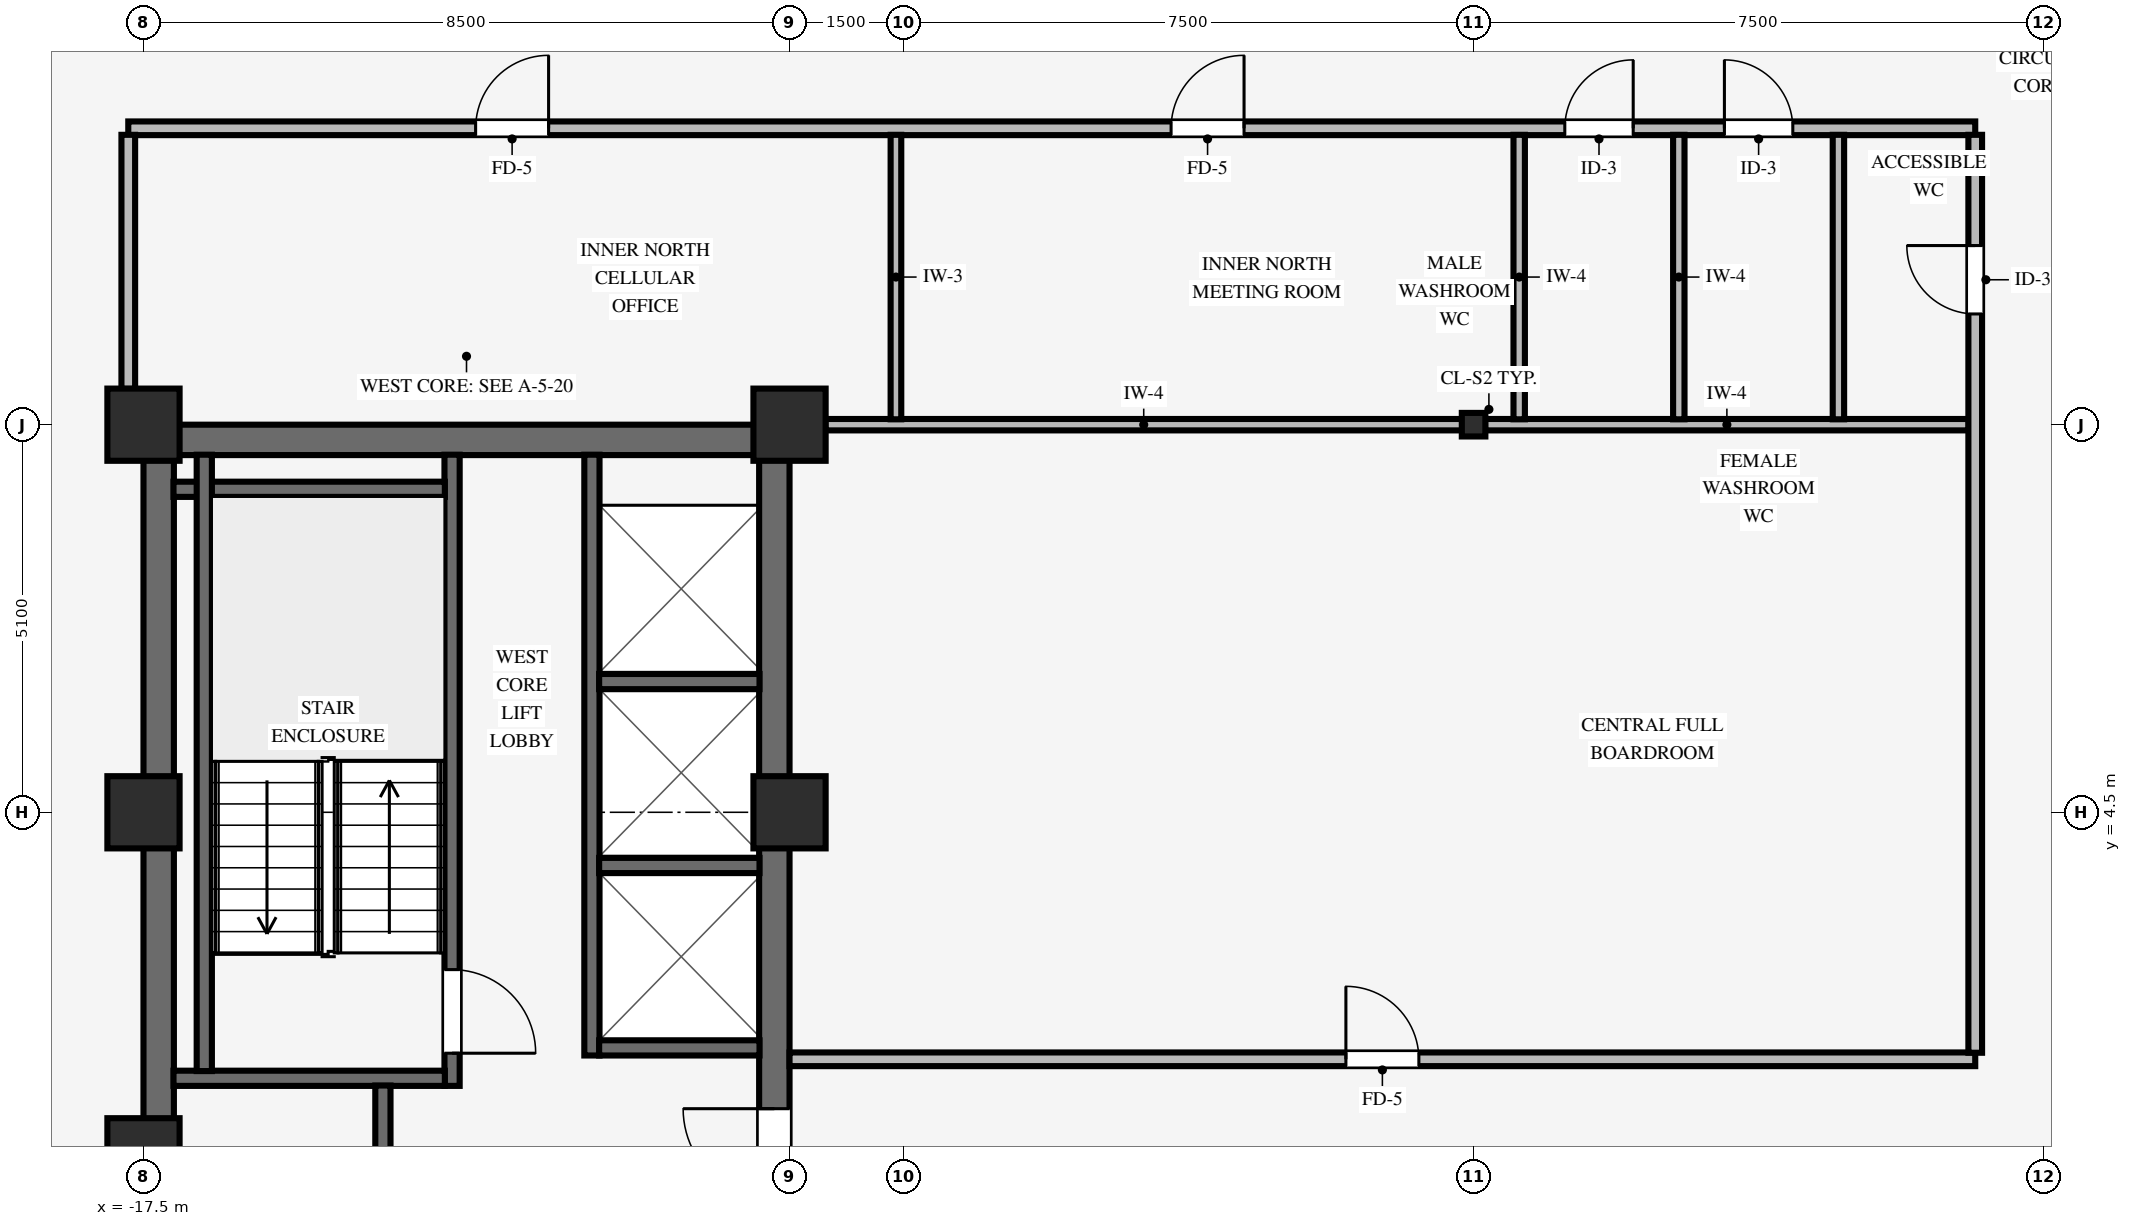
"""IFC4 building model, lengths in metres.
Left out: names, types, materials, properties, quantities, classifications, styles, units other than length and angle.
Written with IfcOpenShell. Run it as: python <this file> out.ifc"""

import sys

from ifc_helpers import new_model, si_unit, direction, frame, frame_2d, origin, origin_2d, place, context, subcontext, project, spatial, rectangle, i_section, extrude, source, transform, mapped, element, fill, save


model = new_model("IFC4")
c1 = context("Model", 3, precision=1e-05, world=origin(), true_north=direction((0.0, 1.0)))
c2 = subcontext(c1, "Body", "Model", "MODEL_VIEW")
j1 = project(units=[si_unit("LENGTHUNIT", "METRE"), si_unit("PLANEANGLEUNIT", "RADIAN")], contexts=[c1])
p1 = place(None, origin())
s1 = spatial("IfcSite", under=j1, at=p1, CompositionType="ELEMENT")
p2 = place(p1, origin())
s2 = spatial("IfcBuilding", under=s1, at=p2, CompositionType="ELEMENT")
p3 = place(p2, frame((0.0, 0.0, 174.95)))
s3 = spatial("IfcBuildingStorey", under=s2, at=p3, CompositionType="ELEMENT", Elevation=174.95)
p4 = place(p3, frame((-17.5, 9.4, 0.0), z_axis=(0.0, 0.0, 1.0), x_axis=(1.0, 0.0, 0.0)))
e1 = element("IfcWall", 1, at=p4, inside=s3, PredefinedType="SHEAR", context=c2, shape_type="SweptSolid", body=[
    extrude(rectangle(XDim=8.5, YDim=0.4, at=frame_2d((4.25, 0.0))), origin(), (0.0, 0.0, 1.0), 3.37),
])
p5 = place(p3, frame((-17.3, -9.205, 0.0), z_axis=(0.0, 0.0, 1.0), x_axis=(0.0, 1.0, 0.0)))
e2 = element("IfcWall", 2, at=p5, inside=s3, PredefinedType="SHEAR", context=c2, shape_type="SweptSolid", body=[
    extrude(rectangle(XDim=18.41, YDim=0.4, at=frame_2d((9.205, 0.0))), origin(), (0.0, 0.0, 1.0), 3.37),
])
p6 = place(p3, frame((-9.2, -9.205, 0.0), z_axis=(0.0, 0.0, 1.0), x_axis=(0.0, 1.0, 0.0)))
e3 = element("IfcWall", 3, at=p6, inside=s3, PredefinedType="SHEAR", context=c2, shape_type="SweptSolid", body=[
    extrude(rectangle(XDim=18.41, YDim=0.4, at=frame_2d((9.205, 0.0))), origin(), (0.0, 0.0, 1.0), 3.37),
])
p7 = place(p6, frame((8.605, 0.0, 0.0)))
e4 = element("IfcOpeningElement", 4, at=p7, cuts=e3, PredefinedType="OPENING", context=c2, shape_type="SweptSolid", body=[
    extrude(rectangle(XDim=1.2, YDim=2.15, at=frame_2d((0.6, 1.075))), frame((0.0, 0.21, 0.0), z_axis=(0.0, -1.0, 0.0), x_axis=(1.0, 0.0, 0.0)), (0.0, 0.0, 1.0), 0.42),
])
for number, where, z_axis, x_axis in (
    (5, (-17.5, 4.5, 0.0), (0.0, 0.0, 1.0), (1.0, 0.0, 0.0)),
    (6, (-17.5, 9.6, 0.0), (0.0, 0.0, 1.0), (1.0, 0.0, 0.0)),
    (7, (-9.0, 4.5, 0.0), (0.0, 0.0, 1.0), (1.0, 0.0, 0.0)),
    (8, (-9.0, 9.6, 0.0), (0.0, 0.0, 1.0), (1.0, 0.0, 0.0)),
    (9, (-17.5, 0.0, 0.0), (0.0, 0.0, 1.0), (1.0, 0.0, 0.0)),
):
    element("IfcColumn", number, at=place(p3, frame(where, z_axis=z_axis, x_axis=x_axis)), inside=s3, PredefinedType="COLUMN", context=c2, shape_type="SweptSolid", body=[
        extrude(rectangle(XDim=0.95, YDim=0.95, at=origin_2d()), origin(), (0.0, 0.0, 1.0), 3.37),
    ])
p8 = place(p3, frame((0.0, 9.6, 0.0), z_axis=(0.0, 0.0, 1.0), x_axis=(1.0, 0.0, 0.0)))
e10 = element("IfcColumn", 10, at=p8, inside=s3, PredefinedType="COLUMN", context=c2, shape_type="SweptSolid", body=[
    extrude(i_section(OverallWidth=0.31, OverallDepth=0.31, WebThickness=0.015, FlangeThickness=0.015, FilletRadius=0.015, at=origin_2d()), origin(), (0.0, 0.0, 1.0), 3.37),
])
p9 = place(p3, frame((-13.44, 0.9, 0.0), z_axis=(0.0, 0.0, 1.0), x_axis=(0.0, 1.0, 0.0)))
e11 = element("IfcWall", 11, at=p9, inside=s3, PredefinedType="SHEAR", context=c2, shape_type="SweptSolid", body=[
    extrude(rectangle(XDim=8.305, YDim=0.2, at=frame_2d((4.153, 0.0))), origin(), (0.0, 0.0, 1.0), 3.37),
])
p10 = place(p9, frame((1.53, 0.0, 0.0), z_axis=(0.0, 0.0, 1.0), x_axis=(-1.0, 0.0, 0.0)))
e12 = element("IfcOpeningElement", 12, at=p10, cuts=e11, PredefinedType="OPENING", context=c2, shape_type="SweptSolid", body=[
    extrude(rectangle(XDim=1.1, YDim=2.15, at=frame_2d((0.55, 1.075))), frame((0.0, 0.11, 0.0), z_axis=(0.0, -1.0, 0.0), x_axis=(1.0, 0.0, 0.0)), (0.0, 0.0, 1.0), 0.22),
])
for number, where, z_axis, x_axis in (
    (13, (-17.105, 1.0, 0.0), (0.0, 0.0, 1.0), (1.0, 0.0, 0.0)),
    (14, (-17.105, 8.75, 0.0), (0.0, 0.0, 1.0), (1.0, 0.0, 0.0)),
):
    element("IfcWall", number, at=place(p3, frame(where, z_axis=z_axis, x_axis=x_axis)), inside=s3, PredefinedType="SHEAR", context=c2, shape_type="SweptSolid", body=[
        extrude(rectangle(XDim=3.57, YDim=0.2, at=frame_2d((1.785, 0.0))), origin(), (0.0, 0.0, 1.0), 3.37),
    ])
p11 = place(p3, frame((-16.7, 1.095, 0.0), z_axis=(0.0, 0.0, 1.0), x_axis=(0.0, 1.0, 0.0)))
e15 = element("IfcWall", 15, at=p11, inside=s3, PredefinedType="SHEAR", context=c2, shape_type="SweptSolid", body=[
    extrude(rectangle(XDim=8.11, YDim=0.2, at=frame_2d((4.055, 0.0))), origin(), (0.0, 0.0, 1.0), 3.37),
])
p12 = place(p3, frame((-14.35, -6.2, 0.0), z_axis=(0.0, 0.0, 1.0), x_axis=(0.0, 1.0, 0.0)))
e16 = element("IfcWall", 16, at=p12, inside=s3, PredefinedType="SHEAR", context=c2, shape_type="SweptSolid", body=[
    extrude(rectangle(XDim=7.105, YDim=0.2, at=frame_2d((3.552, 0.0))), origin(), (0.0, 0.0, 1.0), 3.37),
])
p13 = place(p12, frame((5.69, 0.0, 0.0), z_axis=(0.0, 0.0, 1.0), x_axis=(-1.0, 0.0, 0.0)))
e17 = element("IfcOpeningElement", 17, at=p13, cuts=e16, PredefinedType="OPENING", context=c2, shape_type="SweptSolid", body=[
    extrude(rectangle(XDim=0.88, YDim=2.1, at=frame_2d((0.44, 1.05))), frame((0.0, 0.11, 0.0), z_axis=(0.0, -1.0, 0.0), x_axis=(1.0, 0.0, 0.0)), (0.0, 0.0, 1.0), 0.22),
])
p14 = place(p12, frame((1.15, 0.0, 0.0)))
e18 = element("IfcOpeningElement", 18, at=p14, cuts=e16, PredefinedType="OPENING", context=c2, shape_type="SweptSolid", body=[
    extrude(rectangle(XDim=1.3, YDim=2.2, at=frame_2d((0.65, 1.1))), frame((0.0, 0.11, 0.0), z_axis=(0.0, -1.0, 0.0), x_axis=(1.0, 0.0, 0.0)), (0.0, 0.0, 1.0), 0.22),
])
p15 = place(p3, frame((-11.6, 1.3, 0.0), z_axis=(0.0, 0.0, 1.0), x_axis=(0.0, 1.0, 0.0)))
e19 = element("IfcWall", 19, at=p15, inside=s3, PredefinedType="SHEAR", context=c2, shape_type="SweptSolid", body=[
    extrude(rectangle(XDim=7.905, YDim=0.2, at=frame_2d((3.953, 0.0))), origin(), (0.0, 0.0, 1.0), 3.37),
])
for number, where, z_axis, x_axis in (
    (20, (-11.505, 1.4, 0.0), (0.0, 0.0, 1.0), (1.0, 0.0, 0.0)),
    (21, (-11.505, 3.8, 0.0), (0.0, 0.0, 1.0), (1.0, 0.0, 0.0)),
    (22, (-11.505, 6.22, 0.0), (0.0, 0.0, 1.0), (1.0, 0.0, 0.0)),
):
    element("IfcWall", number, at=place(p3, frame(where, z_axis=z_axis, x_axis=x_axis)), inside=s3, PredefinedType="SHEAR", context=c2, shape_type="SweptSolid", body=[
        extrude(rectangle(XDim=2.11, YDim=0.2, at=frame_2d((1.055, 0.0))), origin(), (0.0, 0.0, 1.0), 3.37),
    ])
p16 = place(p3, frame((-9.0, 1.25, 0.0), z_axis=(0.0, 0.0, 1.0), x_axis=(1.0, 0.0, 0.0)))
e23 = element("IfcWall", 23, at=p16, inside=s3, PredefinedType="PARTITIONING", context=c2, shape_type="SweptSolid", body=[
    extrude(rectangle(XDim=15.6, YDim=0.18, at=frame_2d((7.8, 0.0))), origin(), (0.0, 0.0, 1.0), 3.36),
])
p17 = place(p16, frame((7.32, 0.0, 0.0)))
e24 = element("IfcOpeningElement", 24, at=p17, cuts=e23, PredefinedType="OPENING", context=c2, shape_type="SweptSolid", body=[
    extrude(rectangle(XDim=0.96, YDim=2.1, at=frame_2d((0.48, 1.05))), frame((0.0, 0.1, 0.0), z_axis=(0.0, -1.0, 0.0), x_axis=(1.0, 0.0, 0.0)), (0.0, 0.0, 1.0), 0.2),
])
p18 = place(p3, frame((-8.529, 9.6, 0.0), z_axis=(0.0, 0.0, 1.0), x_axis=(1.0, 0.0, 0.0)))
e25 = element("IfcWall", 25, at=p18, inside=s3, PredefinedType="PARTITIONING", context=c2, shape_type="SweptSolid", body=[
    extrude(rectangle(XDim=8.378, YDim=0.15, at=frame_2d((4.189, 0.0))), origin(), (0.0, 0.0, 1.0), 2.405),
])
p19 = place(p3, frame((0.151, 9.6, 0.0), z_axis=(0.0, 0.0, 1.0), x_axis=(1.0, 0.0, 0.0)))
e26 = element("IfcWall", 26, at=p19, inside=s3, PredefinedType="PARTITIONING", context=c2, shape_type="SweptSolid", body=[
    extrude(rectangle(XDim=6.363, YDim=0.15, at=frame_2d((3.182, 0.0))), origin(), (0.0, 0.0, 1.0), 2.405),
])
p20 = place(p3, frame((-17.7, 13.5, 0.0), z_axis=(0.0, 0.0, 1.0), x_axis=(1.0, 0.0, 0.0)))
e27 = element("IfcWall", 27, at=p20, inside=s3, PredefinedType="PARTITIONING", context=c2, shape_type="SweptSolid", body=[
    extrude(rectangle(XDim=24.3, YDim=0.18, at=frame_2d((12.15, 0.0))), origin(), (0.0, 0.0, 1.0), 3.008),
])
p21 = place(p20, frame((4.57, 0.0, 0.0)))
e28 = element("IfcOpeningElement", 28, at=p21, cuts=e27, PredefinedType="OPENING", context=c2, shape_type="SweptSolid", body=[
    extrude(rectangle(XDim=0.96, YDim=2.1, at=frame_2d((0.48, 1.05))), frame((0.0, 0.1, 0.0), z_axis=(0.0, -1.0, 0.0), x_axis=(1.0, 0.0, 0.0)), (0.0, 0.0, 1.0), 0.2),
])
p22 = place(p20, frame((13.72, 0.0, 0.0)))
e29 = element("IfcOpeningElement", 29, at=p22, cuts=e27, PredefinedType="OPENING", context=c2, shape_type="SweptSolid", body=[
    extrude(rectangle(XDim=0.96, YDim=2.1, at=frame_2d((0.48, 1.05))), frame((0.0, 0.1, 0.0), z_axis=(0.0, -1.0, 0.0), x_axis=(1.0, 0.0, 0.0)), (0.0, 0.0, 1.0), 0.2),
])
p23 = place(p20, frame((18.9, 0.0, 0.0)))
e30 = element("IfcOpeningElement", 30, at=p23, cuts=e27, PredefinedType="OPENING", context=c2, shape_type="SweptSolid", body=[
    extrude(rectangle(XDim=0.9, YDim=2.1, at=frame_2d((0.45, 1.05))), frame((0.0, 0.1, 0.0), z_axis=(0.0, -1.0, 0.0), x_axis=(1.0, 0.0, 0.0)), (0.0, 0.0, 1.0), 0.2),
])
p24 = place(p20, frame((21.0, 0.0, 0.0)))
e31 = element("IfcOpeningElement", 31, at=p24, cuts=e27, PredefinedType="OPENING", context=c2, shape_type="SweptSolid", body=[
    extrude(rectangle(XDim=0.9, YDim=2.1, at=frame_2d((0.45, 1.05))), frame((0.0, 0.1, 0.0), z_axis=(0.0, -1.0, 0.0), x_axis=(1.0, 0.0, 0.0)), (0.0, 0.0, 1.0), 0.2),
])
p25 = place(p3, frame((-17.7, 10.071, 0.0), z_axis=(0.0, 0.0, 1.0), x_axis=(0.0, 1.0, 0.0)))
e32 = element("IfcWall", 32, at=p25, inside=s3, PredefinedType="PARTITIONING", context=c2, shape_type="SweptSolid", body=[
    extrude(rectangle(XDim=3.343, YDim=0.18, at=frame_2d((1.671, 0.0))), origin(), (0.0, 0.0, 1.0), 2.816),
])
p26 = place(p3, frame((-7.6, 9.671, 0.0), z_axis=(0.0, 0.0, 1.0), x_axis=(0.0, 1.0, 0.0)))
e33 = element("IfcWall", 33, at=p26, inside=s3, PredefinedType="PARTITIONING", context=c2, shape_type="SweptSolid", body=[
    extrude(rectangle(XDim=3.743, YDim=0.14, at=frame_2d((1.872, 0.0))), origin(), (0.0, 0.0, 1.0), 3.36),
])
for number, where, z_axis, x_axis in (
    (34, (0.6, 9.671, 0.0), (0.0, 0.0, 1.0), (0.0, 1.0, 0.0)),
    (35, (2.7, 9.671, 0.0), (0.0, 0.0, 1.0), (0.0, 1.0, 0.0)),
    (36, (4.8, 9.671, 0.0), (0.0, 0.0, 1.0), (0.0, 1.0, 0.0)),
):
    element("IfcWall", number, at=place(p3, frame(where, z_axis=z_axis, x_axis=x_axis)), inside=s3, PredefinedType="PARTITIONING", context=c2, shape_type="SweptSolid", body=[
        extrude(rectangle(XDim=3.743, YDim=0.15, at=frame_2d((1.872, 0.0))), origin(), (0.0, 0.0, 1.0), 3.36),
    ])
p27 = place(p3, frame((6.6, 1.336, 0.0), z_axis=(0.0, 0.0, 1.0), x_axis=(0.0, 1.0, 0.0)))
e37 = element("IfcWall", 37, at=p27, inside=s3, PredefinedType="PARTITIONING", context=c2, shape_type="SweptSolid", body=[
    extrude(rectangle(XDim=12.078, YDim=0.18, at=frame_2d((6.039, 0.0))), origin(), (0.0, 0.0, 1.0), 3.36),
])
p28 = place(p27, frame((9.721, 0.0, 0.0)))
e38 = element("IfcOpeningElement", 38, at=p28, cuts=e37, PredefinedType="OPENING", context=c2, shape_type="SweptSolid", body=[
    extrude(rectangle(XDim=0.9, YDim=2.1, at=frame_2d((0.45, 1.05))), frame((0.0, 0.1, 0.0), z_axis=(0.0, -1.0, 0.0), x_axis=(1.0, 0.0, 0.0)), (0.0, 0.0, 1.0), 0.2),
])
m1 = source(origin(), c2, "Body", "SweptSolid", [
    extrude(rectangle(XDim=1.1, YDim=2.15, at=frame_2d((0.55, 1.075))), frame((0.0, 0.025, 0.0), z_axis=(0.0, -1.0, 0.0), x_axis=(1.0, 0.0, 0.0)), (0.0, 0.0, 1.0), 0.05),
])
p29 = place(p10, origin())
e39 = element("IfcDoor", 39, at=p29, inside=s3, OperationType="SINGLE_SWING_RIGHT", PredefinedType="DOOR", context=c2, shape_type="MappedRepresentation", body=[
    mapped(m1, transform((0.0, 0.0, 0.0), scale=1.0)),
])
fill(e12, e39)
m2 = source(origin(), c2, "Body", "SweptSolid", [
    extrude(rectangle(XDim=1.2, YDim=2.15, at=frame_2d((0.6, 1.075))), frame((0.0, 0.025, 0.0), z_axis=(0.0, -1.0, 0.0), x_axis=(1.0, 0.0, 0.0)), (0.0, 0.0, 1.0), 0.05),
])
p30 = place(p7, origin())
e40 = element("IfcDoor", 40, at=p30, inside=s3, OperationType="SINGLE_SWING_RIGHT", PredefinedType="DOOR", context=c2, shape_type="MappedRepresentation", body=[
    mapped(m2, transform((0.0, 0.0, 0.0), scale=1.0)),
])
fill(e4, e40)
m3 = source(origin(), c2, "Body", "SweptSolid", [
    extrude(rectangle(XDim=0.96, YDim=2.1, at=frame_2d((0.48, 1.05))), frame((0.0, 0.025, 0.0), z_axis=(0.0, -1.0, 0.0), x_axis=(1.0, 0.0, 0.0)), (0.0, 0.0, 1.0), 0.05),
])
p31 = place(p17, origin())
e41 = element("IfcDoor", 41, at=p31, inside=s3, OperationType="SINGLE_SWING_LEFT", PredefinedType="DOOR", context=c2, shape_type="MappedRepresentation", body=[
    mapped(m3, transform((0.0, 0.0, 0.0), scale=1.0)),
])
fill(e24, e41)
p32 = place(p21, origin())
e42 = element("IfcDoor", 42, at=p32, inside=s3, OperationType="SINGLE_SWING_RIGHT", PredefinedType="DOOR", context=c2, shape_type="MappedRepresentation", body=[
    mapped(m3, transform((0.0, 0.0, 0.0), scale=1.0)),
])
fill(e28, e42)
p33 = place(p22, origin())
e43 = element("IfcDoor", 43, at=p33, inside=s3, OperationType="SINGLE_SWING_RIGHT", PredefinedType="DOOR", context=c2, shape_type="MappedRepresentation", body=[
    mapped(m3, transform((0.0, 0.0, 0.0), scale=1.0)),
])
fill(e29, e43)
m4 = source(origin(), c2, "Body", "SweptSolid", [
    extrude(rectangle(XDim=0.9, YDim=2.1, at=frame_2d((0.45, 1.05))), frame((0.0, 0.025, 0.0), z_axis=(0.0, -1.0, 0.0), x_axis=(1.0, 0.0, 0.0)), (0.0, 0.0, 1.0), 0.05),
])
p34 = place(p28, origin())
e44 = element("IfcDoor", 44, at=p34, inside=s3, OperationType="SINGLE_SWING_RIGHT", PredefinedType="DOOR", context=c2, shape_type="MappedRepresentation", body=[
    mapped(m4, transform((0.0, 0.0, 0.0), scale=1.0)),
])
fill(e38, e44)
p35 = place(p23, origin())
e45 = element("IfcDoor", 45, at=p35, inside=s3, OperationType="SINGLE_SWING_RIGHT", PredefinedType="DOOR", context=c2, shape_type="MappedRepresentation", body=[
    mapped(m4, transform((0.0, 0.0, 0.0), scale=1.0)),
])
fill(e30, e45)
p36 = place(p24, origin())
e46 = element("IfcDoor", 46, at=p36, inside=s3, OperationType="SINGLE_SWING_LEFT", PredefinedType="DOOR", context=c2, shape_type="MappedRepresentation", body=[
    mapped(m4, transform((0.0, 0.0, 0.0), scale=1.0)),
])
fill(e31, e46)
save(model, sys.argv[1])
